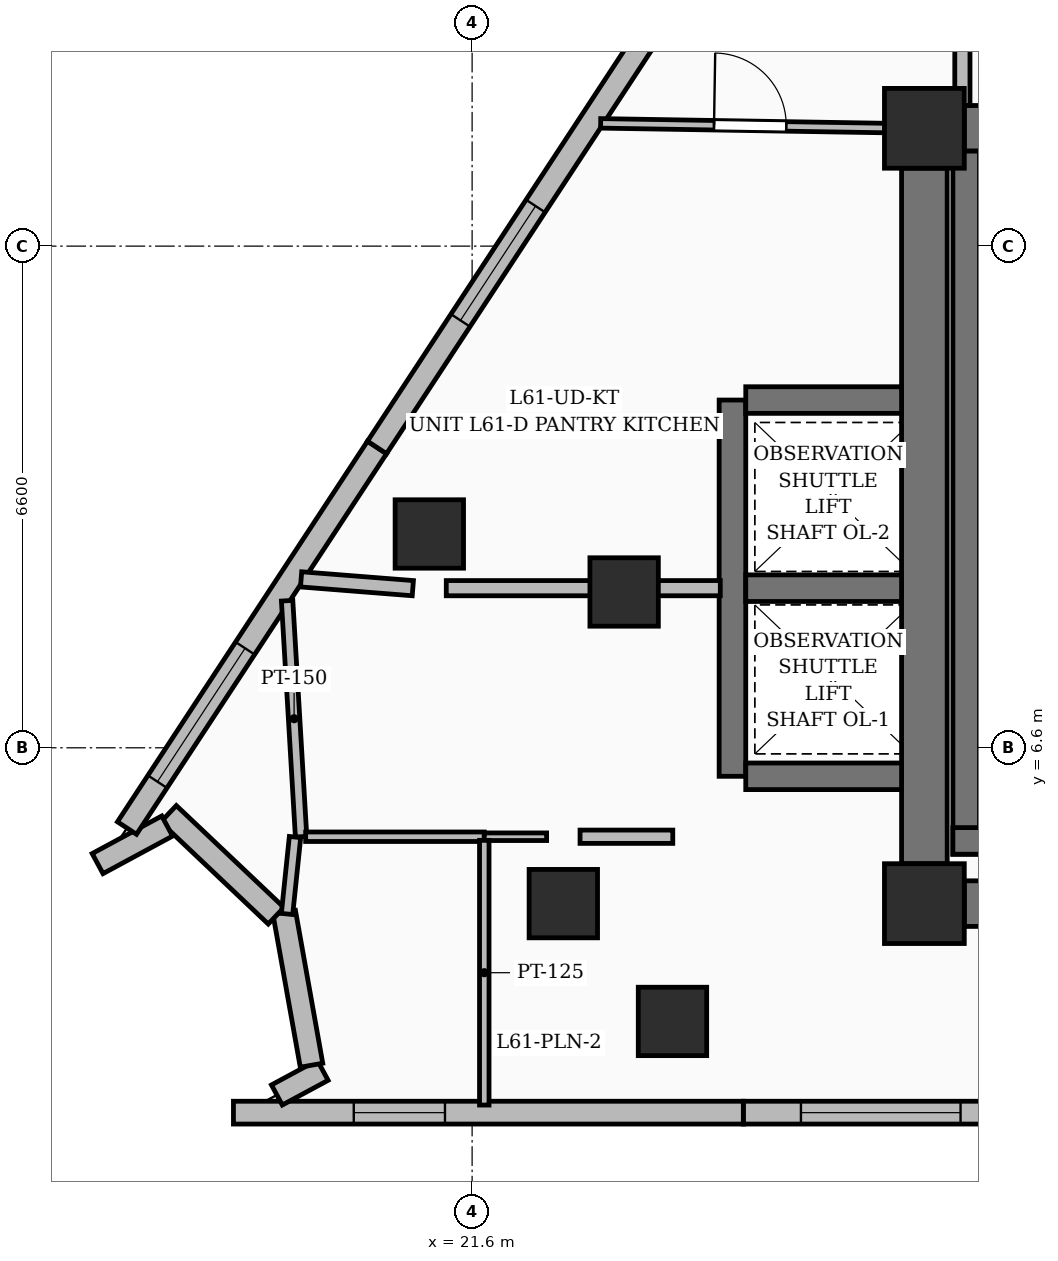
"""IFC4 building model, lengths in metres.
Left out: names, types, materials, properties, quantities, classifications, styles, units other than length and angle.
Written with IfcOpenShell. Run it as: python <this file> out.ifc"""

import sys

from ifc_helpers import new_model, si_unit, direction, frame, frame_2d, origin, origin_2d, place, context, subcontext, project, spatial, rectangle, extrude, element, fill, save


model = new_model("IFC4")
c1 = context("Model", 3, precision=1e-05, world=origin(), true_north=direction((0.0, 1.0)))
c2 = subcontext(c1, "Body", "Model", "MODEL_VIEW")
j1 = project(units=[si_unit("LENGTHUNIT", "METRE"), si_unit("PLANEANGLEUNIT", "RADIAN")], contexts=[c1])
p1 = place(None, origin())
s1 = spatial("IfcSite", under=j1, at=p1, CompositionType="ELEMENT")
p2 = place(p1, origin())
s2 = spatial("IfcBuilding", under=s1, at=p2, CompositionType="ELEMENT")
p3 = place(p2, frame((0.0, 0.0, 237.0)))
s3 = spatial("IfcBuildingStorey", under=s2, at=p3, CompositionType="ELEMENT", Elevation=237.0)
for number, where, z_axis, x_axis in (
    (1, (27.55, 4.55, 0.0), (0.0, 0.0, 1.0), (1.0, 0.0, 0.0)),
    (2, (27.55, 14.75, 0.0), (0.0, 0.0, 1.0), (1.0, 0.0, 0.0)),
):
    element("IfcColumn", number, at=place(p3, frame(where, z_axis=z_axis, x_axis=x_axis)), inside=s3, PredefinedType="COLUMN", context=c2, shape_type="SweptSolid", body=[
        extrude(rectangle(XDim=1.05, YDim=1.05, at=origin_2d()), origin(), (0.0, 0.0, 1.0), 3.75),
    ])
for number, where, z_axis, x_axis in (
    (3, (22.8, 4.55, 0.0), (0.0, 0.0, 1.0), (1.0, 0.0, 0.0)),
    (4, (23.6, 8.65, 0.0), (0.0, 0.0, 1.0), (1.0, 0.0, 0.0)),
):
    element("IfcColumn", number, at=place(p3, frame(where, z_axis=z_axis, x_axis=x_axis)), inside=s3, PredefinedType="COLUMN", context=c2, shape_type="SweptSolid", body=[
        extrude(rectangle(XDim=0.9, YDim=0.9, at=origin_2d()), origin(), (0.0, 0.0, 1.0), 3.75),
    ])
p4 = place(p3, frame((28.075, 4.55, 0.0), z_axis=(0.0, 0.0, 1.0), x_axis=(1.0, 0.0, 0.0)))
e5 = element("IfcWall", 5, at=p4, inside=s3, PredefinedType="SHEAR", context=c2, shape_type="SweptSolid", body=[
    extrude(rectangle(XDim=6.55, YDim=0.6, at=frame_2d((3.275, 0.0))), origin(), (0.0, 0.0, 1.0), 3.75),
])
p5 = place(p3, frame((28.075, 14.75, 0.0), z_axis=(0.0, 0.0, 1.0), x_axis=(1.0, 0.0, 0.0)))
e6 = element("IfcWall", 6, at=p5, inside=s3, PredefinedType="SHEAR", context=c2, shape_type="SweptSolid", body=[
    extrude(rectangle(XDim=6.55, YDim=0.6, at=frame_2d((3.275, 0.0))), origin(), (0.0, 0.0, 1.0), 3.75),
])
p6 = place(p5, frame((1.1, 0.0, 0.0)))
e7 = element("IfcOpeningElement", 7, at=p6, cuts=e6, PredefinedType="OPENING", context=c2, shape_type="SweptSolid", body=[
    extrude(rectangle(XDim=1.05, YDim=2.15, at=frame_2d((0.525, 1.075))), frame((0.0, 0.31, 0.0), z_axis=(0.0, -1.0, 0.0), x_axis=(1.0, 0.0, 0.0)), (0.0, 0.0, 1.0), 0.62),
])
p7 = place(p5, frame((4.95, 0.0, 0.0)))
e8 = element("IfcOpeningElement", 8, at=p7, cuts=e6, PredefinedType="OPENING", context=c2, shape_type="SweptSolid", body=[
    extrude(rectangle(XDim=0.95, YDim=2.15, at=frame_2d((0.475, 1.075))), frame((0.0, 0.31, 0.0), z_axis=(0.0, -1.0, 0.0), x_axis=(1.0, 0.0, 0.0)), (0.0, 0.0, 1.0), 0.62),
])
p8 = place(p3, frame((27.55, 5.075, 0.0), z_axis=(0.0, 0.0, 1.0), x_axis=(0.0, 1.0, 0.0)))
e9 = element("IfcWall", 9, at=p8, inside=s3, PredefinedType="SHEAR", context=c2, shape_type="SweptSolid", body=[
    extrude(rectangle(XDim=9.15, YDim=0.6, at=frame_2d((4.575, 0.0))), origin(), (0.0, 0.0, 1.0), 3.75),
])
p9 = place(p3, frame((28.1, 5.2, 0.0), z_axis=(0.0, 0.0, 1.0), x_axis=(0.0, 1.0, 0.0)))
e10 = element("IfcWall", 10, at=p9, inside=s3, PredefinedType="SOLIDWALL", context=c2, shape_type="SweptSolid", body=[
    extrude(rectangle(XDim=9.25, YDim=0.35, at=frame_2d((4.625, 0.0))), origin(), (0.0, 0.0, 1.0), 3.75),
])
p10 = place(p3, frame((27.925, 5.375, 0.0), z_axis=(0.0, 0.0, 1.0), x_axis=(1.0, 0.0, 0.0)))
e11 = element("IfcWall", 11, at=p10, inside=s3, PredefinedType="SOLIDWALL", context=c2, shape_type="SweptSolid", body=[
    extrude(rectangle(XDim=3.55, YDim=0.35, at=frame_2d((1.775, 0.0))), origin(), (0.0, 0.0, 1.0), 3.75),
])
p11 = place(p3, frame((25.025, 6.225, 0.0), z_axis=(0.0, 0.0, 1.0), x_axis=(0.0, 1.0, 0.0)))
e12 = element("IfcWall", 12, at=p11, inside=s3, PredefinedType="SOLIDWALL", context=c2, shape_type="SweptSolid", body=[
    extrude(rectangle(XDim=4.95, YDim=0.35, at=frame_2d((2.475, 0.0))), origin(), (0.0, 0.0, 1.0), 3.75),
])
for number, where, z_axis, x_axis in (
    (13, (25.2, 6.225, 0.0), (0.0, 0.0, 1.0), (1.0, 0.0, 0.0)),
    (14, (25.2, 8.7, 0.0), (0.0, 0.0, 1.0), (1.0, 0.0, 0.0)),
    (15, (25.2, 11.175, 0.0), (0.0, 0.0, 1.0), (1.0, 0.0, 0.0)),
):
    element("IfcWall", number, at=place(p3, frame(where, z_axis=z_axis, x_axis=x_axis)), inside=s3, PredefinedType="SOLIDWALL", context=c2, shape_type="SweptSolid", body=[
        extrude(rectangle(XDim=2.05, YDim=0.35, at=frame_2d((1.025, 0.0))), origin(), (0.0, 0.0, 1.0), 3.75),
    ])
for number, where, z_axis, x_axis in (
    (16, (24.236, 3.0, 0.0), (0.0, 0.0, 1.0), (1.0, 0.0, 0.0)),
    (17, (21.037, 9.413, 0.0), (0.0, 0.0, 1.0), (1.0, 0.0, 0.0)),
):
    element("IfcColumn", number, at=place(p3, frame(where, z_axis=z_axis, x_axis=x_axis)), inside=s3, PredefinedType="COLUMN", context=c2, shape_type="SweptSolid", body=[
        extrude(rectangle(XDim=0.9, YDim=0.9, at=origin_2d()), origin(), (0.0, 0.0, 1.0), 3.75),
    ])
p12 = place(p3, frame((31.601, 1.8, 0.0), z_axis=(0.0, 0.0, 1.0), x_axis=(-1.0, 0.0, 0.0)))
e18 = element("IfcWall", 18, at=p12, inside=s3, PredefinedType="SOLIDWALL", context=c2, shape_type="SweptSolid", body=[
    extrude(rectangle(XDim=6.433, YDim=0.3, at=frame_2d((3.217, 0.0))), origin(), (0.0, 0.0, 1.0), 3.5),
])
p13 = place(p12, frame((0.575, 0.0, 0.55)))
e19 = element("IfcOpeningElement", 19, at=p13, cuts=e18, PredefinedType="OPENING", context=c2, shape_type="SweptSolid", body=[
    extrude(rectangle(XDim=2.1, YDim=2.4, at=frame_2d((1.05, 1.2))), frame((0.0, 0.16, 0.0), z_axis=(0.0, -1.0, 0.0), x_axis=(1.0, 0.0, 0.0)), (0.0, 0.0, 1.0), 0.32),
])
p14 = place(p12, frame((3.575, 0.0, 0.55)))
e20 = element("IfcOpeningElement", 20, at=p14, cuts=e18, PredefinedType="OPENING", context=c2, shape_type="SweptSolid", body=[
    extrude(rectangle(XDim=2.1, YDim=2.4, at=frame_2d((1.05, 1.2))), frame((0.0, 0.16, 0.0), z_axis=(0.0, -1.0, 0.0), x_axis=(1.0, 0.0, 0.0)), (0.0, 0.0, 1.0), 0.32),
])
p15 = place(p3, frame((25.168, 1.8, 0.0), z_axis=(0.0, 0.0, 1.0), x_axis=(-1.0, 0.0, 0.0)))
e21 = element("IfcWall", 21, at=p15, inside=s3, PredefinedType="SOLIDWALL", context=c2, shape_type="SweptSolid", body=[
    extrude(rectangle(XDim=6.708, YDim=0.3, at=frame_2d((3.354, 0.0))), origin(), (0.0, 0.0, 1.0), 3.5),
])
p16 = place(p15, frame((3.925, 0.0, 0.8)))
e22 = element("IfcOpeningElement", 22, at=p16, cuts=e21, PredefinedType="OPENING", context=c2, shape_type="SweptSolid", body=[
    extrude(rectangle(XDim=1.2, YDim=1.8, at=frame_2d((0.6, 0.9))), frame((0.0, 0.16, 0.0), z_axis=(0.0, -1.0, 0.0), x_axis=(1.0, 0.0, 0.0)), (0.0, 0.0, 1.0), 0.32),
])
p17 = place(p3, frame((19.031, 2.032, 0.0), z_axis=(0.0, 0.0, 1.0), x_axis=(0.880242040971, 0.474524972269, 0.0)))
e23 = element("IfcWall", 23, at=p17, inside=s3, PredefinedType="SOLIDWALL", context=c2, shape_type="SweptSolid", body=[
    extrude(rectangle(XDim=0.685, YDim=0.3, at=frame_2d((0.342, 0.0))), origin(), (0.0, 0.0, 1.0), 3.5),
])
p18 = place(p3, frame((19.487, 2.424, 0.0), z_axis=(0.0, 0.0, 1.0), x_axis=(-0.175993262493, 0.984391371131, 0.0)))
e24 = element("IfcWall", 24, at=p18, inside=s3, PredefinedType="SOLIDWALL", context=c2, shape_type="SweptSolid", body=[
    extrude(rectangle(XDim=2.043, YDim=0.3, at=frame_2d((1.022, 0.0))), origin(), (0.0, 0.0, 1.0), 3.5),
])
p19 = place(p3, frame((19.021, 4.391, 0.0), z_axis=(0.0, 0.0, 1.0), x_axis=(-0.726127048854, 0.687560549277, 0.0)))
e25 = element("IfcWall", 25, at=p19, inside=s3, PredefinedType="SOLIDWALL", context=c2, shape_type="SweptSolid", body=[
    extrude(rectangle(XDim=1.95, YDim=0.3, at=frame_2d((0.975, 0.0))), origin(), (0.0, 0.0, 1.0), 3.5),
])
p20 = place(p3, frame((17.588, 5.571, 0.0), z_axis=(0.0, 0.0, 1.0), x_axis=(-0.879852407073, -0.475247032361, 0.0)))
e26 = element("IfcWall", 26, at=p20, inside=s3, PredefinedType="SOLIDWALL", context=c2, shape_type="SweptSolid", body=[
    extrude(rectangle(XDim=1.04, YDim=0.3, at=frame_2d((0.52, 0.0))), origin(), (0.0, 0.0, 1.0), 3.5),
])
p21 = place(p3, frame((17.06, 5.544, 0.0), z_axis=(0.0, 0.0, 1.0), x_axis=(0.549025808549, 0.835805396936, 0.0)))
e27 = element("IfcWall", 27, at=p21, inside=s3, PredefinedType="SOLIDWALL", context=c2, shape_type="SweptSolid", body=[
    extrude(rectangle(XDim=5.991, YDim=0.3, at=frame_2d((2.995, 0.0))), origin(), (0.0, 0.0, 1.0), 3.5),
])
p22 = place(p21, frame((0.73, 0.0, 0.55)))
e28 = element("IfcOpeningElement", 28, at=p22, cuts=e27, PredefinedType="OPENING", context=c2, shape_type="SweptSolid", body=[
    extrude(rectangle(XDim=2.1, YDim=2.4, at=frame_2d((1.05, 1.2))), frame((0.0, 0.16, 0.0), z_axis=(0.0, -1.0, 0.0), x_axis=(1.0, 0.0, 0.0)), (0.0, 0.0, 1.0), 0.32),
])
p23 = place(p3, frame((20.349, 10.551, 0.0), z_axis=(0.0, 0.0, 1.0), x_axis=(0.549037128291, 0.835797961087, 0.0)))
e29 = element("IfcWall", 29, at=p23, inside=s3, PredefinedType="SOLIDWALL", context=c2, shape_type="SweptSolid", body=[
    extrude(rectangle(XDim=6.611, YDim=0.3, at=frame_2d((3.305, 0.0))), origin(), (0.0, 0.0, 1.0), 3.5),
])
p24 = place(p23, frame((2.0, 0.0, 0.6)))
e30 = element("IfcOpeningElement", 30, at=p24, cuts=e29, PredefinedType="OPENING", context=c2, shape_type="SweptSolid", body=[
    extrude(rectangle(XDim=1.8, YDim=2.1, at=frame_2d((0.9, 1.05))), frame((0.0, 0.16, 0.0), z_axis=(0.0, -1.0, 0.0), x_axis=(1.0, 0.0, 0.0)), (0.0, 0.0, 1.0), 0.32),
])
p25 = place(p3, frame((28.05, 16.665, 0.0), z_axis=(0.0, 0.0, 1.0), x_axis=(0.0, -1.0, 0.0)))
e31 = element("IfcWall", 31, at=p25, inside=s3, PredefinedType="PARTITIONING", context=c2, shape_type="SweptSolid", body=[
    extrude(rectangle(XDim=1.615, YDim=0.2, at=frame_2d((0.808, 0.0))), origin(), (0.0, 0.0, 1.0), 3.16),
])
p26 = place(p3, frame((19.166, 8.535, 0.0), z_axis=(0.0, 0.0, 1.0), x_axis=(0.059182134753, -0.998247201311, 0.0)))
e32 = element("IfcWall", 32, at=p26, inside=s3, PredefinedType="PARTITIONING", context=c2, shape_type="SweptSolid", body=[
    extrude(rectangle(XDim=3.11, YDim=0.15, at=frame_2d((1.555, 0.0))), origin(), (0.0, 0.0, 1.0), 3.5),
])
p27 = place(p3, frame((19.41, 5.43, 0.0), z_axis=(0.0, 0.0, 1.0), x_axis=(1.0, 0.0, 0.0)))
e33 = element("IfcWall", 33, at=p27, inside=s3, PredefinedType="PARTITIONING", context=c2, shape_type="SweptSolid", body=[
    extrude(rectangle(XDim=2.35, YDim=0.125, at=frame_2d((1.175, 0.0))), origin(), (0.0, 0.0, 1.0), 3.5),
])
p28 = place(p3, frame((21.76, 5.43, 0.0), z_axis=(0.0, 0.0, 1.0), x_axis=(1.0, 0.0, 0.0)))
e34 = element("IfcWall", 34, at=p28, inside=s3, PredefinedType="PARTITIONING", context=c2, shape_type="SweptSolid", body=[
    extrude(rectangle(XDim=0.82, YDim=0.1, at=frame_2d((0.41, 0.0))), origin(), (0.0, 0.0, 1.0), 3.5),
])
p29 = place(p3, frame((23.02, 5.43, 0.0), z_axis=(0.0, 0.0, 1.0), x_axis=(1.0, 0.0, 0.0)))
e35 = element("IfcWall", 35, at=p29, inside=s3, PredefinedType="PARTITIONING", context=c2, shape_type="SweptSolid", body=[
    extrude(rectangle(XDim=1.22, YDim=0.175, at=frame_2d((0.61, 0.0))), origin(), (0.0, 0.0, 1.0), 2.82),
])
p30 = place(p3, frame((20.82, 8.7, 0.0), z_axis=(0.0, 0.0, 1.0), x_axis=(-0.996902591157, 0.078646193456, 0.0)))
e36 = element("IfcWall", 36, at=p30, inside=s3, PredefinedType="PARTITIONING", context=c2, shape_type="SweptSolid", body=[
    extrude(rectangle(XDim=1.475, YDim=0.2, at=frame_2d((0.737, 0.0))), origin(), (0.0, 0.0, 1.0), 3.5),
])
p31 = place(p3, frame((24.865, 8.7, 0.0), z_axis=(0.0, 0.0, 1.0), x_axis=(-1.0, 0.0, 0.0)))
e37 = element("IfcWall", 37, at=p31, inside=s3, PredefinedType="PARTITIONING", context=c2, shape_type="SweptSolid", body=[
    extrude(rectangle(XDim=3.605, YDim=0.2, at=frame_2d((1.802, 0.0))), origin(), (0.0, 0.0, 1.0), 2.685),
])
p32 = place(p3, frame((19.165, 4.414, 0.0), z_axis=(0.0, 0.0, 1.0), x_axis=(0.103185695327, 0.994662109603, 0.0)))
e38 = element("IfcWall", 38, at=p32, inside=s3, PredefinedType="PARTITIONING", context=c2, shape_type="SweptSolid", body=[
    extrude(rectangle(XDim=1.017, YDim=0.15, at=frame_2d((0.509, 0.0))), origin(), (0.0, 0.0, 1.0), 3.5),
])
p33 = place(p3, frame((21.76, 1.9, 0.0), z_axis=(0.0, 0.0, 1.0), x_axis=(0.0, 1.0, 0.0)))
e39 = element("IfcWall", 39, at=p33, inside=s3, PredefinedType="PARTITIONING", context=c2, shape_type="SweptSolid", body=[
    extrude(rectangle(XDim=3.483, YDim=0.125, at=frame_2d((1.741, 0.0))), origin(), (0.0, 0.0, 1.0), 3.5),
])
p34 = place(p3, frame((23.291, 14.815, 0.0), z_axis=(0.0, 0.0, 1.0), x_axis=(0.999865488885, -0.016401345587, 0.0)))
e40 = element("IfcWall", 40, at=p34, inside=s3, PredefinedType="PARTITIONING", context=c2, shape_type="SweptSolid", body=[
    extrude(rectangle(XDim=3.959, YDim=0.125, at=frame_2d((1.98, 0.0))), origin(), (0.0, 0.0, 1.0), 2.82),
])
p35 = place(p34, frame((1.492, 0.0, 0.0)))
e41 = element("IfcOpeningElement", 41, at=p35, cuts=e40, PredefinedType="OPENING", context=c2, shape_type="SweptSolid", body=[
    extrude(rectangle(XDim=0.95, YDim=2.2, at=frame_2d((0.475, 1.1))), frame((0.0, 0.072, 0.0), z_axis=(0.0, -1.0, 0.0), x_axis=(1.0, 0.0, 0.0)), (0.0, 0.0, 1.0), 0.145),
])
p36 = place(p14, origin())
e42 = element("IfcWindow", 42, at=p36, inside=s3, PartitioningType="SINGLE_PANEL", PredefinedType="WINDOW", context=c2, shape_type="SweptSolid", body=[
    extrude(rectangle(XDim=2.1, YDim=2.4, at=frame_2d((1.05, 1.2))), frame((0.0, 0.03, 0.0), z_axis=(0.0, -1.0, 0.0), x_axis=(1.0, 0.0, 0.0)), (0.0, 0.0, 1.0), 0.06),
])
fill(e20, e42)
p37 = place(p16, origin())
e43 = element("IfcWindow", 43, at=p37, inside=s3, PartitioningType="SINGLE_PANEL", PredefinedType="WINDOW", context=c2, shape_type="SweptSolid", body=[
    extrude(rectangle(XDim=1.2, YDim=1.8, at=frame_2d((0.6, 0.9))), frame((0.0, 0.03, 0.0), z_axis=(0.0, -1.0, 0.0), x_axis=(1.0, 0.0, 0.0)), (0.0, 0.0, 1.0), 0.06),
])
fill(e22, e43)
p38 = place(p22, origin())
e44 = element("IfcWindow", 44, at=p38, inside=s3, PartitioningType="SINGLE_PANEL", PredefinedType="WINDOW", context=c2, shape_type="SweptSolid", body=[
    extrude(rectangle(XDim=2.1, YDim=2.4, at=frame_2d((1.05, 1.2))), frame((0.0, 0.03, 0.0), z_axis=(0.0, -1.0, 0.0), x_axis=(1.0, 0.0, 0.0)), (0.0, 0.0, 1.0), 0.06),
])
fill(e28, e44)
p39 = place(p24, origin())
e45 = element("IfcWindow", 45, at=p39, inside=s3, PartitioningType="SINGLE_PANEL", PredefinedType="WINDOW", context=c2, shape_type="SweptSolid", body=[
    extrude(rectangle(XDim=1.8, YDim=2.1, at=frame_2d((0.9, 1.05))), frame((0.0, 0.03, 0.0), z_axis=(0.0, -1.0, 0.0), x_axis=(1.0, 0.0, 0.0)), (0.0, 0.0, 1.0), 0.06),
])
fill(e30, e45)
p40 = place(p35, origin())
e46 = element("IfcDoor", 46, at=p40, inside=s3, OperationType="SINGLE_SWING_LEFT", PredefinedType="DOOR", context=c2, shape_type="SweptSolid", body=[
    extrude(rectangle(XDim=0.95, YDim=2.2, at=frame_2d((0.475, 1.1))), frame((0.0, 0.025, 0.0), z_axis=(0.0, -1.0, 0.0), x_axis=(1.0, 0.0, 0.0)), (0.0, 0.0, 1.0), 0.05),
])
fill(e41, e46)
save(model, sys.argv[1])
